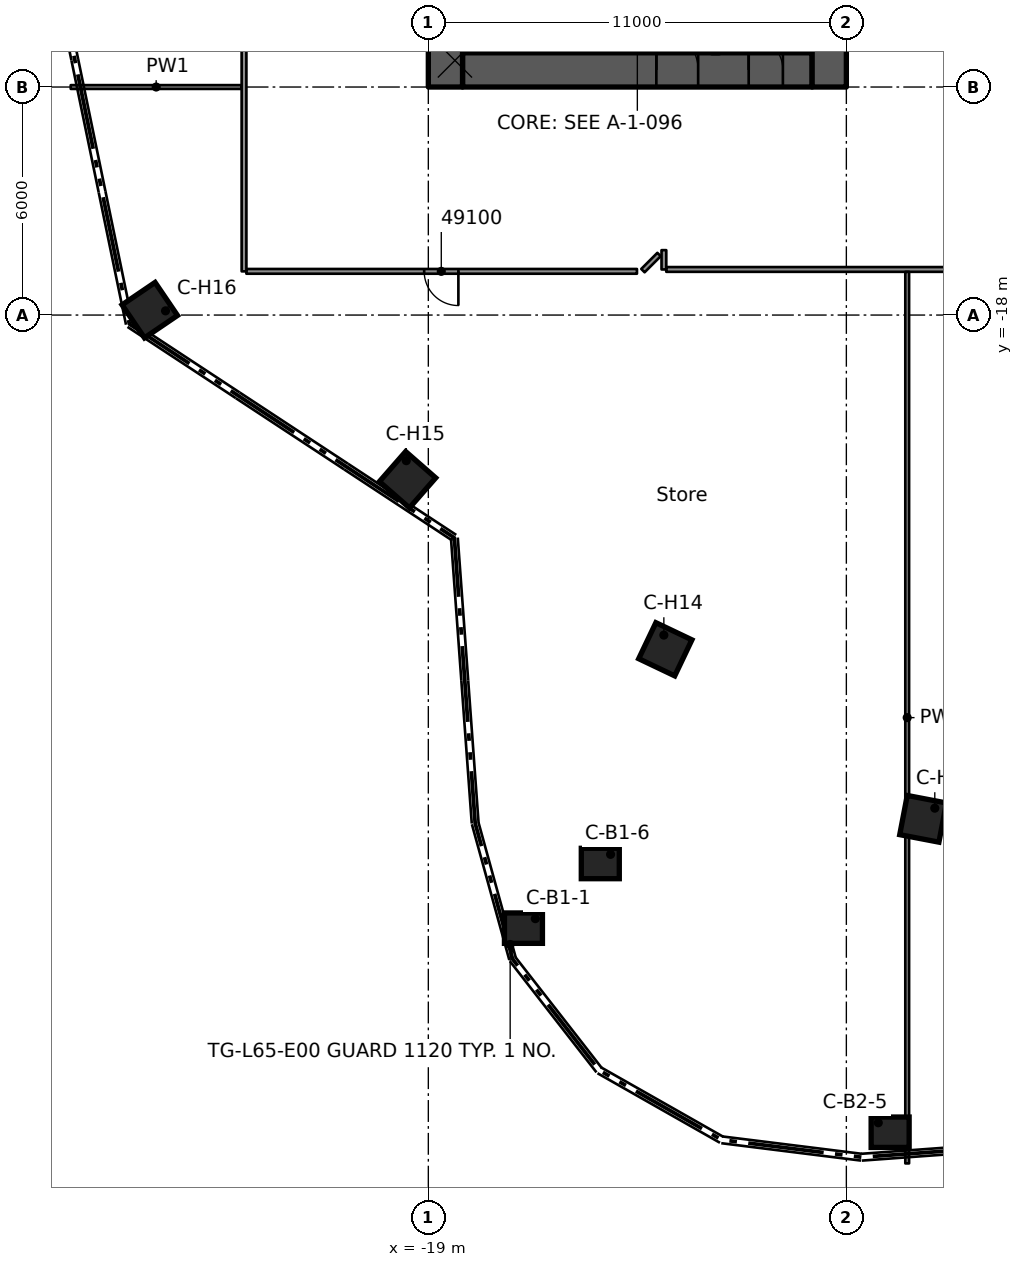
"""IFC4 building model, lengths in metres.
Left out: names, types, materials, properties, quantities, classifications, styles, units other than length and angle.
Written with IfcOpenShell. Run it as: python <this file> out.ifc"""

import sys

from ifc_helpers import new_model, si_unit, direction, frame, frame_2d, origin, origin_2d, place, context, subcontext, project, spatial, rectangle, extrude, element, fill, save


model = new_model("IFC4")
c1 = context("Model", 3, precision=1e-05, world=origin(), true_north=direction((0.0, 1.0)))
c2 = subcontext(c1, "Body", "Model", "MODEL_VIEW")
j1 = project(units=[si_unit("LENGTHUNIT", "METRE"), si_unit("PLANEANGLEUNIT", "RADIAN")], contexts=[c1])
p1 = place(None, origin())
s1 = spatial("IfcSite", under=j1, at=p1, CompositionType="ELEMENT")
p2 = place(p1, origin())
s2 = spatial("IfcBuilding", under=s1, at=p2, CompositionType="ELEMENT")
p3 = place(p2, frame((0.0, 0.0, 246.0)))
s3 = spatial("IfcBuildingStorey", under=s2, at=p3, CompositionType="ELEMENT", Elevation=246.0)
p4 = place(p3, frame((-18.1, -11.55, 0.0), z_axis=(0.0, 0.0, 1.0), x_axis=(1.0, 0.0, 0.0)))
e1 = element("IfcWall", 1, at=p4, inside=s3, PredefinedType="SHEAR", context=c2, shape_type="SweptSolid", body=[
    extrude(rectangle(XDim=9.2, YDim=0.9, at=frame_2d((4.6, 0.0))), origin(), (0.0, 0.0, 1.0), 3.5),
])
p5 = place(p4, frame((5.1, 0.0, 0.0)))
e2 = element("IfcOpeningElement", 2, at=p5, cuts=e1, PredefinedType="OPENING", context=c2, shape_type="SweptSolid", body=[
    extrude(rectangle(XDim=1.1, YDim=2.1, at=frame_2d((0.55, 1.05))), frame((0.0, 0.46, 0.0), z_axis=(0.0, -1.0, 0.0), x_axis=(1.0, 0.0, 0.0)), (0.0, 0.0, 1.0), 0.92),
])
p6 = place(p4, frame((7.53, 0.0, 0.0)))
e3 = element("IfcOpeningElement", 3, at=p6, cuts=e1, PredefinedType="OPENING", context=c2, shape_type="SweptSolid", body=[
    extrude(rectangle(XDim=0.9, YDim=2.1, at=frame_2d((0.45, 1.05))), frame((0.0, 0.46, 0.0), z_axis=(0.0, -1.0, 0.0), x_axis=(1.0, 0.0, 0.0)), (0.0, 0.0, 1.0), 0.92),
])
p7 = place(p3, frame((-18.55, -12.0, 0.0), z_axis=(0.0, 0.0, 1.0), x_axis=(0.0, 1.0, 0.0)))
e4 = element("IfcWall", 4, at=p7, inside=s3, PredefinedType="SHEAR", context=c2, shape_type="SweptSolid", body=[
    extrude(rectangle(XDim=24.0, YDim=0.9, at=frame_2d((12.0, 0.0))), origin(), (0.0, 0.0, 1.0), 3.5),
])
p8 = place(p7, frame((10.1, 0.0, 0.0)))
e5 = element("IfcOpeningElement", 5, at=p8, cuts=e4, PredefinedType="OPENING", context=c2, shape_type="SweptSolid", body=[
    extrude(rectangle(XDim=1.8, YDim=2.1, at=frame_2d((0.9, 1.05))), frame((0.0, 0.46, 0.0), z_axis=(0.0, -1.0, 0.0), x_axis=(1.0, 0.0, 0.0)), (0.0, 0.0, 1.0), 0.92),
])
p9 = place(p3, frame((-8.45, -12.0, 0.0), z_axis=(0.0, 0.0, 1.0), x_axis=(0.0, 1.0, 0.0)))
e6 = element("IfcWall", 6, at=p9, inside=s3, PredefinedType="SHEAR", context=c2, shape_type="SweptSolid", body=[
    extrude(rectangle(XDim=24.0, YDim=0.9, at=frame_2d((12.0, 0.0))), origin(), (0.0, 0.0, 1.0), 3.5),
])
p10 = place(p9, frame((9.6, 0.0, 0.0)))
e7 = element("IfcOpeningElement", 7, at=p10, cuts=e6, PredefinedType="OPENING", context=c2, shape_type="SweptSolid", body=[
    extrude(rectangle(XDim=1.8, YDim=2.1, at=frame_2d((0.9, 1.05))), frame((0.0, 0.46, 0.0), z_axis=(0.0, -1.0, 0.0), x_axis=(1.0, 0.0, 0.0)), (0.0, 0.0, 1.0), 0.92),
])
p11 = place(p9, frame((19.65, 0.0, 0.0)))
e8 = element("IfcOpeningElement", 8, at=p11, cuts=e6, PredefinedType="OPENING", context=c2, shape_type="SweptSolid", body=[
    extrude(rectangle(XDim=1.1, YDim=2.1, at=frame_2d((0.55, 1.05))), frame((0.0, 0.46, 0.0), z_axis=(0.0, -1.0, 0.0), x_axis=(1.0, 0.0, 0.0)), (0.0, 0.0, 1.0), 0.92),
])
for number, where, z_axis, x_axis in (
    (9, (-16.497, -34.132, 0.0), (0.0, 0.0, 1.0), (1.0, 0.0, 0.0)),
    (10, (-14.475, -32.431, 0.0), (0.0, 0.0, 1.0), (1.0, 0.0, 0.0)),
    (11, (-6.848, -39.502, 0.0), (0.0, 0.0, 1.0), (1.0, 0.0, 0.0)),
):
    element("IfcColumn", number, at=place(p3, frame(where, z_axis=z_axis, x_axis=x_axis)), inside=s3, PredefinedType="COLUMN", context=c2, shape_type="SweptSolid", body=[
        extrude(rectangle(XDim=1.0, YDim=0.8, at=origin_2d()), origin(), (0.0, 0.0, 1.0), 3.5),
    ])
for number, where, z_axis, x_axis in (
    (12, (-5.981, -31.255, 0.0), (0.0, 0.0, 1.0), (-0.188, -0.982, 0.0)),
    (13, (-12.764, -26.794, 0.0), (0.0, 0.0, 1.0), (-0.43, -0.903, 0.0)),
    (14, (-19.547, -22.333, 0.0), (0.0, 0.0, 1.0), (-0.659, -0.752, 0.0)),
    (15, (-26.33, -17.871, 0.0), (0.0, 0.0, 1.0), (-0.827, -0.562, 0.0)),
):
    element("IfcColumn", number, at=place(p3, frame(where, z_axis=z_axis, x_axis=x_axis)), inside=s3, PredefinedType="COLUMN", context=c2, shape_type="SweptSolid", body=[
        extrude(rectangle(XDim=1.05, YDim=1.05, at=origin_2d()), origin(), (0.0, 0.0, 1.0), 3.5),
    ])
p12 = place(p3, frame((-11.44, -11.1, 0.0), z_axis=(0.0, 0.0, 1.0), x_axis=(0.0, 1.0, 0.0)))
e16 = element("IfcWall", 16, at=p12, inside=s3, PredefinedType="SOLIDWALL", context=c2, shape_type="SweptSolid", body=[
    extrude(rectangle(XDim=4.125, YDim=0.2, at=frame_2d((2.062, 0.0))), origin(), (0.0, 0.0, 1.0), 3.08),
])
p13 = place(p3, frame((-13.51, -16.85, 0.0), z_axis=(0.0, 0.0, 1.0), x_axis=(-1.0, 0.0, 0.0)))
e17 = element("IfcWall", 17, at=p13, inside=s3, PredefinedType="PARTITIONING", context=c2, shape_type="SweptSolid", body=[
    extrude(rectangle(XDim=10.278, YDim=0.125, at=frame_2d((5.139, 0.0))), origin(), (0.0, 0.0, 1.0), 3.06),
])
p14 = place(p13, frame((4.699, 0.0, 0.0)))
e18 = element("IfcOpeningElement", 18, at=p14, cuts=e17, PredefinedType="OPENING", context=c2, shape_type="SweptSolid", body=[
    extrude(rectangle(XDim=0.9, YDim=2.1, at=frame_2d((0.45, 1.05))), frame((0.0, 0.073, 0.0), z_axis=(0.0, -1.0, 0.0), x_axis=(1.0, 0.0, 0.0)), (0.0, 0.0, 1.0), 0.145),
])
p15 = place(p3, frame((12.739, -16.8, 0.0), z_axis=(0.0, 0.0, 1.0), x_axis=(-1.0, 0.0, 0.0)))
e19 = element("IfcWall", 19, at=p15, inside=s3, PredefinedType="PARTITIONING", context=c2, shape_type="SweptSolid", body=[
    extrude(rectangle(XDim=25.478, YDim=0.125, at=frame_2d((12.739, 0.0))), origin(), (0.0, 0.0, 1.0), 3.06),
])
p16 = place(p15, frame((15.088, 0.0, 0.0)))
e20 = element("IfcOpeningElement", 20, at=p16, cuts=e19, PredefinedType="OPENING", context=c2, shape_type="SweptSolid", body=[
    extrude(rectangle(XDim=1.8, YDim=2.1, at=frame_2d((0.9, 1.05))), frame((0.0, 0.073, 0.0), z_axis=(0.0, -1.0, 0.0), x_axis=(1.0, 0.0, 0.0)), (0.0, 0.0, 1.0), 0.145),
])
p17 = place(p15, frame((9.189, 0.0, 0.0)))
e21 = element("IfcOpeningElement", 21, at=p17, cuts=e19, PredefinedType="OPENING", context=c2, shape_type="SweptSolid", body=[
    extrude(rectangle(XDim=0.9, YDim=2.1, at=frame_2d((0.45, 1.05))), frame((0.0, 0.073, 0.0), z_axis=(0.0, -1.0, 0.0), x_axis=(1.0, 0.0, 0.0)), (0.0, 0.0, 1.0), 0.145),
])
p18 = place(p3, frame((-28.41, -12.0, 0.0), z_axis=(0.0, 0.0, 1.0), x_axis=(1.0, 0.0, 0.0)))
e22 = element("IfcWall", 22, at=p18, inside=s3, PredefinedType="PARTITIONING", context=c2, shape_type="SweptSolid", body=[
    extrude(rectangle(XDim=4.497, YDim=0.1, at=frame_2d((2.249, 0.0))), origin(), (0.0, 0.0, 1.0), 3.06),
])
p19 = place(p3, frame((-13.353, -16.831, 0.0), z_axis=(0.0, 0.0, 1.0), x_axis=(0.707106781187, 0.707106781187, 0.0)))
e23 = element("IfcWall", 23, at=p19, inside=s3, PredefinedType="PARTITIONING", context=c2, shape_type="SweptSolid", body=[
    extrude(rectangle(XDim=0.6, YDim=0.125, at=frame_2d((0.3, 0.0))), origin(), (0.0, 0.0, 1.0), 3.06),
])
p20 = place(p3, frame((-6.399, -40.322, 0.0), z_axis=(0.0, 0.0, 1.0), x_axis=(0.0, 1.0, 0.0)))
e24 = element("IfcWall", 24, at=p20, inside=s3, PredefinedType="PARTITIONING", context=c2, shape_type="SweptSolid", body=[
    extrude(rectangle(XDim=23.459, YDim=0.1, at=frame_2d((11.729, 0.0))), origin(), (0.0, 0.0, 1.0), 2.425),
])
p21 = place(p3, frame((-12.801, -16.8, 0.0), z_axis=(0.0, 0.0, 1.0), x_axis=(0.0, 1.0, 0.0)))
e25 = element("IfcWall", 25, at=p21, inside=s3, PredefinedType="PARTITIONING", context=c2, shape_type="SweptSolid", body=[
    extrude(rectangle(XDim=0.508, YDim=0.125, at=frame_2d((0.254, 0.0))), origin(), (0.0, 0.0, 1.0), 3.06),
])
p22 = place(p3, frame((-23.85, -16.85, 0.0), z_axis=(0.0, 0.0, 1.0), x_axis=(0.0, 1.0, 0.0)))
e26 = element("IfcWall", 26, at=p22, inside=s3, PredefinedType="PARTITIONING", context=c2, shape_type="SweptSolid", body=[
    extrude(rectangle(XDim=33.701, YDim=0.125, at=frame_2d((16.851, 0.0))), origin(), (0.0, 0.0, 1.0), 3.06),
])
p23 = place(p22, frame((10.2, 0.0, 0.0)))
e27 = element("IfcOpeningElement", 27, at=p23, cuts=e26, PredefinedType="OPENING", context=c2, shape_type="SweptSolid", body=[
    extrude(rectangle(XDim=1.1, YDim=2.1, at=frame_2d((0.55, 1.05))), frame((0.0, 0.073, 0.0), z_axis=(0.0, -1.0, 0.0), x_axis=(1.0, 0.0, 0.0)), (0.0, 0.0, 1.0), 0.145),
])
p24 = place(p22, frame((25.451, 0.0, 0.0)))
e28 = element("IfcOpeningElement", 28, at=p24, cuts=e26, PredefinedType="OPENING", context=c2, shape_type="SweptSolid", body=[
    extrude(rectangle(XDim=0.9, YDim=2.1, at=frame_2d((0.45, 1.05))), frame((0.0, 0.073, 0.0), z_axis=(0.0, -1.0, 0.0), x_axis=(1.0, 0.0, 0.0)), (0.0, 0.0, 1.0), 0.145),
])
p25 = place(p22, frame((19.202, 0.0, 0.0)))
e29 = element("IfcOpeningElement", 29, at=p25, cuts=e26, PredefinedType="OPENING", context=c2, shape_type="SweptSolid", body=[
    extrude(rectangle(XDim=1.1, YDim=2.1, at=frame_2d((0.55, 1.05))), frame((0.0, 0.073, 0.0), z_axis=(0.0, -1.0, 0.0), x_axis=(1.0, 0.0, 0.0)), (0.0, 0.0, 1.0), 0.145),
])
p26 = place(p5, origin())
e30 = element("IfcDoor", 30, at=p26, inside=s3, OperationType="SINGLE_SWING_RIGHT", PredefinedType="DOOR", context=c2, shape_type="SweptSolid", body=[
    extrude(rectangle(XDim=1.1, YDim=2.1, at=frame_2d((0.55, 1.05))), frame((0.0, 0.025, 0.0), z_axis=(0.0, -1.0, 0.0), x_axis=(1.0, 0.0, 0.0)), (0.0, 0.0, 1.0), 0.05),
])
fill(e2, e30)
p27 = place(p6, origin())
e31 = element("IfcDoor", 31, at=p27, inside=s3, OperationType="SINGLE_SWING_RIGHT", PredefinedType="DOOR", context=c2, shape_type="SweptSolid", body=[
    extrude(rectangle(XDim=0.9, YDim=2.1, at=frame_2d((0.45, 1.05))), frame((0.0, 0.025, 0.0), z_axis=(0.0, -1.0, 0.0), x_axis=(1.0, 0.0, 0.0)), (0.0, 0.0, 1.0), 0.05),
])
fill(e3, e31)
p28 = place(p14, origin())
e32 = element("IfcDoor", 32, at=p28, inside=s3, OperationType="SINGLE_SWING_RIGHT", PredefinedType="DOOR", context=c2, shape_type="SweptSolid", body=[
    extrude(rectangle(XDim=0.9, YDim=2.1, at=frame_2d((0.45, 1.05))), frame((0.0, 0.025, 0.0), z_axis=(0.0, -1.0, 0.0), x_axis=(1.0, 0.0, 0.0)), (0.0, 0.0, 1.0), 0.05),
])
fill(e18, e32)
save(model, sys.argv[1])
